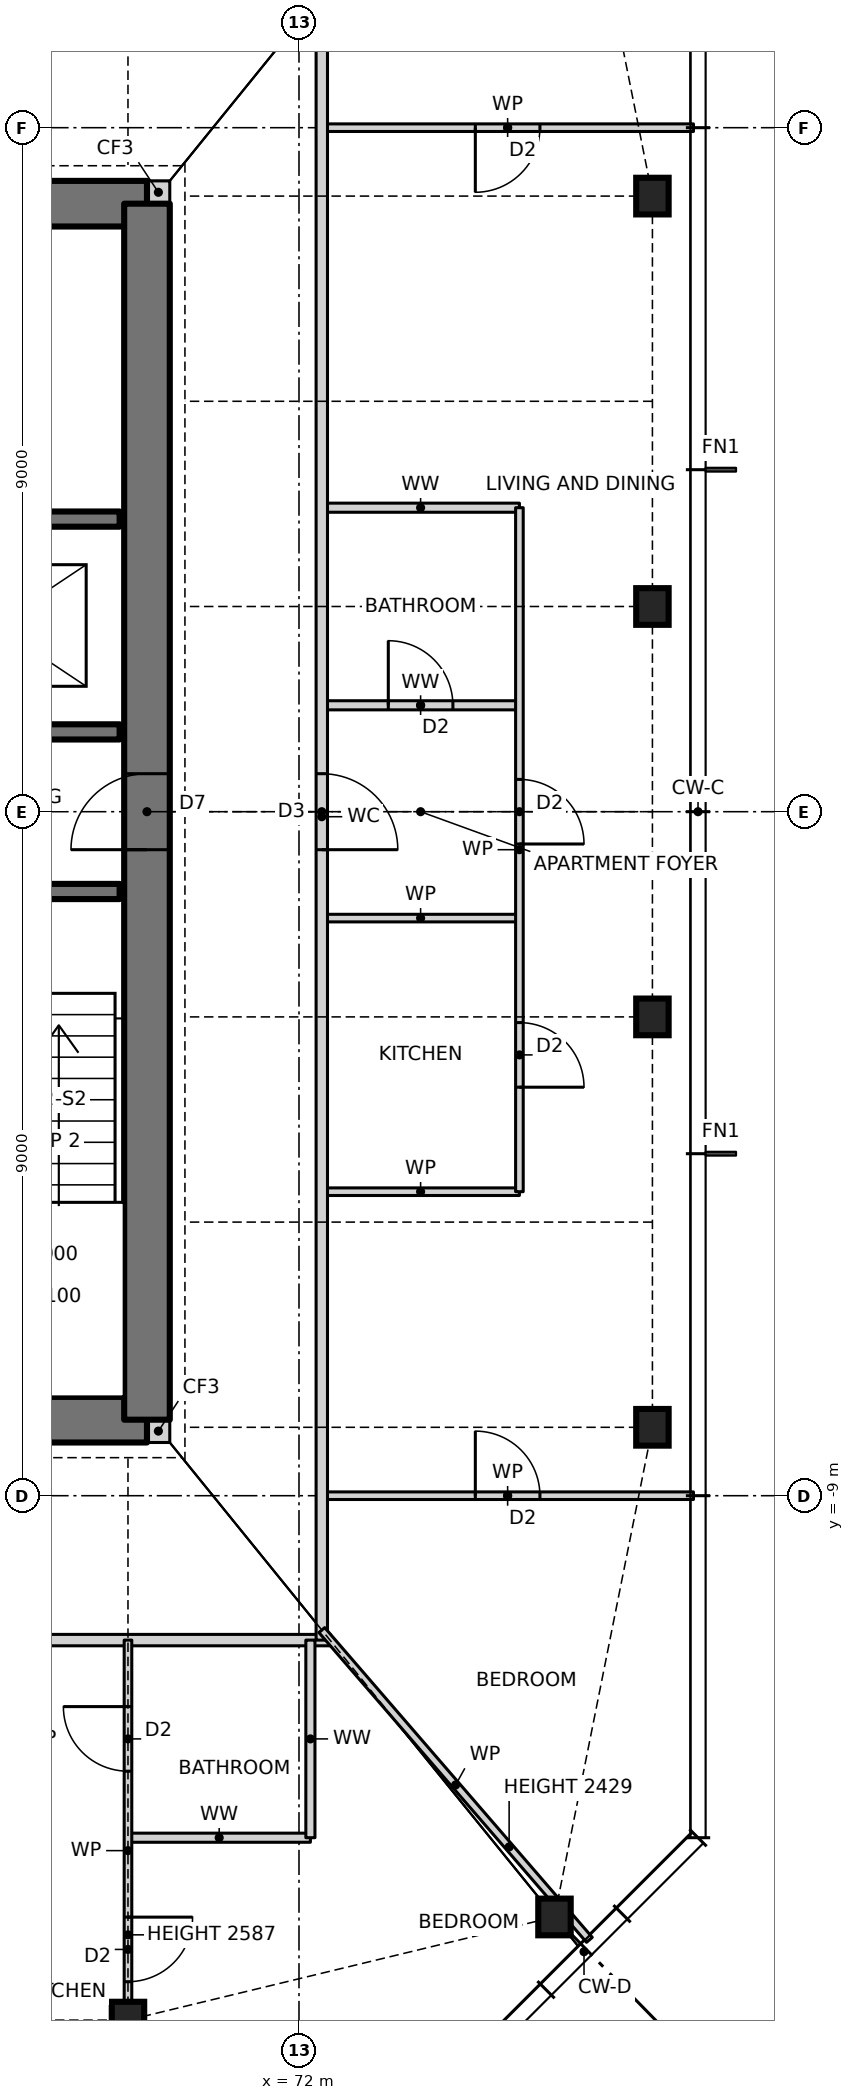
"""IFC4 building model, lengths in metres.
Left out: names, types, materials, properties, quantities, classifications, styles, units other than length and angle.
Written with IfcOpenShell. Run it as: python <this file> out.ifc"""

import sys

from ifc_helpers import new_model, si_unit, direction, frame, frame_2d, origin, origin_2d, place, context, subcontext, project, spatial, rectangle, i_section, extrude, element, fill, save


model = new_model("IFC4")
c1 = context("Model", 3, precision=1e-05, world=origin(), true_north=direction((0.0, 1.0)))
c2 = subcontext(c1, "Body", "Model", "MODEL_VIEW")
j1 = project(units=[si_unit("LENGTHUNIT", "METRE"), si_unit("PLANEANGLEUNIT", "RADIAN")], contexts=[c1])
p1 = place(None, origin())
s1 = spatial("IfcSite", under=j1, at=p1, CompositionType="ELEMENT")
p2 = place(p1, origin())
s2 = spatial("IfcBuilding", under=s1, at=p2, CompositionType="ELEMENT")
p3 = place(p2, frame((0.0, 0.0, 87.5)))
s3 = spatial("IfcBuildingStorey", under=s2, at=p3, CompositionType="ELEMENT", Elevation=87.5)
for number, where, z_axis, x_axis in (
    (1, (69.75, -15.9, 0.0), (0.0, 0.0, 1.0), (1.0, 0.0, 0.0)),
    (2, (75.361, -14.543, 0.0), (0.0, 0.0, 1.0), (1.0, 0.0, 0.0)),
    (3, (76.65, -8.1, 0.0), (0.0, 0.0, 1.0), (1.0, 0.0, 0.0)),
    (4, (76.65, -2.7, 0.0), (0.0, 0.0, 1.0), (1.0, 0.0, 0.0)),
    (5, (76.65, 2.7, 0.0), (0.0, 0.0, 1.0), (1.0, 0.0, 0.0)),
    (6, (76.65, 8.1, 0.0), (0.0, 0.0, 1.0), (1.0, 0.0, 0.0)),
):
    element("IfcColumn", number, at=place(p3, frame(where, z_axis=z_axis, x_axis=x_axis)), inside=s3, PredefinedType="COLUMN", context=c2, shape_type="SweptSolid", body=[
        extrude(i_section(OverallWidth=0.427, OverallDepth=0.483, WebThickness=0.051, FlangeThickness=0.082, at=origin_2d()), origin(), (0.0, 0.0, 1.0), 3.5),
    ])
for number, where, z_axis, x_axis in (
    (7, (70.0, -8.15, 0.0), (0.0, 0.0, 1.0), (1.0, 0.0, 0.0)),
    (8, (70.0, 8.15, 0.0), (0.0, 0.0, 1.0), (1.0, 0.0, 0.0)),
):
    element("IfcWall", number, at=place(p3, frame(where, z_axis=z_axis, x_axis=x_axis)), inside=s3, PredefinedType="SOLIDWALL", context=c2, shape_type="SweptSolid", body=[
        extrude(rectangle(XDim=0.3, YDim=0.3, at=frame_2d((0.15, 0.0))), origin(), (0.0, 0.0, 1.0), 3.5),
    ])
p4 = place(p3, frame((56.0, -8.0, 0.0), z_axis=(0.0, 0.0, 1.0), x_axis=(1.0, 0.0, 0.0)))
e9 = element("IfcWall", 9, at=p4, inside=s3, PredefinedType="SHEAR", context=c2, shape_type="SweptSolid", body=[
    extrude(rectangle(XDim=14.0, YDim=0.6, at=frame_2d((7.0, 0.0))), origin(), (0.0, 0.0, 1.0), 3.5),
])
p5 = place(p4, frame((2.7, 0.0, 0.0)))
e10 = element("IfcOpeningElement", 10, at=p5, cuts=e9, PredefinedType="OPENING", context=c2, shape_type="SweptSolid", body=[
    extrude(rectangle(XDim=0.9, YDim=2.1, at=frame_2d((0.45, 1.05))), frame((0.0, 0.31, 0.0), z_axis=(0.0, -1.0, 0.0), x_axis=(1.0, 0.0, 0.0)), (0.0, 0.0, 1.0), 0.62),
])
p6 = place(p4, frame((7.7, 0.0, 0.0)))
e11 = element("IfcOpeningElement", 11, at=p6, cuts=e9, PredefinedType="OPENING", context=c2, shape_type="SweptSolid", body=[
    extrude(rectangle(XDim=0.9, YDim=2.1, at=frame_2d((0.45, 1.05))), frame((0.0, 0.31, 0.0), z_axis=(0.0, -1.0, 0.0), x_axis=(1.0, 0.0, 0.0)), (0.0, 0.0, 1.0), 0.62),
])
p7 = place(p3, frame((70.0, 8.0, 0.0), z_axis=(0.0, 0.0, 1.0), x_axis=(-1.0, 0.0, 0.0)))
e12 = element("IfcWall", 12, at=p7, inside=s3, PredefinedType="SHEAR", context=c2, shape_type="SweptSolid", body=[
    extrude(rectangle(XDim=14.0, YDim=0.6, at=frame_2d((7.0, 0.0))), origin(), (0.0, 0.0, 1.0), 3.5),
])
p8 = place(p7, frame((8.2, 0.0, 0.0)))
e13 = element("IfcOpeningElement", 13, at=p8, cuts=e12, PredefinedType="OPENING", context=c2, shape_type="SweptSolid", body=[
    extrude(rectangle(XDim=0.9, YDim=2.1, at=frame_2d((0.45, 1.05))), frame((0.0, 0.31, 0.0), z_axis=(0.0, -1.0, 0.0), x_axis=(1.0, 0.0, 0.0)), (0.0, 0.0, 1.0), 0.62),
])
p9 = place(p7, frame((3.2, 0.0, 0.0)))
e14 = element("IfcOpeningElement", 14, at=p9, cuts=e12, PredefinedType="OPENING", context=c2, shape_type="SweptSolid", body=[
    extrude(rectangle(XDim=0.9, YDim=2.1, at=frame_2d((0.45, 1.05))), frame((0.0, 0.31, 0.0), z_axis=(0.0, -1.0, 0.0), x_axis=(1.0, 0.0, 0.0)), (0.0, 0.0, 1.0), 0.62),
])
p10 = place(p3, frame((70.0, -8.0, 0.0), z_axis=(0.0, 0.0, 1.0), x_axis=(0.0, 1.0, 0.0)))
e15 = element("IfcWall", 15, at=p10, inside=s3, PredefinedType="SHEAR", context=c2, shape_type="SweptSolid", body=[
    extrude(rectangle(XDim=16.0, YDim=0.6, at=frame_2d((8.0, 0.0))), origin(), (0.0, 0.0, 1.0), 3.5),
])
p11 = place(p10, frame((7.5, 0.0, 0.0)))
e16 = element("IfcOpeningElement", 16, at=p11, cuts=e15, PredefinedType="OPENING", context=c2, shape_type="SweptSolid", body=[
    extrude(rectangle(XDim=1.0, YDim=2.1, at=frame_2d((0.5, 1.05))), frame((0.0, 0.31, 0.0), z_axis=(0.0, -1.0, 0.0), x_axis=(1.0, 0.0, 0.0)), (0.0, 0.0, 1.0), 0.62),
])
p12 = place(p3, frame((69.75, -13.5, 0.0), z_axis=(0.0, 0.0, 1.0), x_axis=(1.0, 0.0, 0.0)))
e17 = element("IfcWall", 17, at=p12, inside=s3, PredefinedType="PARTITIONING", context=c2, shape_type="SweptSolid", body=[
    extrude(rectangle(XDim=2.4, YDim=0.12, at=frame_2d((1.2, 0.0))), origin(), (0.0, 0.0, 1.0), 3.27),
])
p13 = place(p3, frame((53.586, -10.9, 0.0), z_axis=(0.0, 0.0, 1.0), x_axis=(1.0, 0.0, 0.0)))
e18 = element("IfcWall", 18, at=p13, inside=s3, PredefinedType="PARTITIONING", context=c2, shape_type="SweptSolid", body=[
    extrude(rectangle(XDim=18.828, YDim=0.15, at=frame_2d((9.414, 0.0))), origin(), (0.0, 0.0, 1.0), 3.27),
])
p14 = place(p13, frame((3.564, 0.0, 0.0)))
e19 = element("IfcOpeningElement", 19, at=p14, cuts=e18, PredefinedType="OPENING", context=c2, shape_type="SweptSolid", body=[
    extrude(rectangle(XDim=1.0, YDim=2.1, at=frame_2d((0.5, 1.05))), frame((0.0, 0.085, 0.0), z_axis=(0.0, -1.0, 0.0), x_axis=(1.0, 0.0, 0.0)), (0.0, 0.0, 1.0), 0.17),
])
p15 = place(p13, frame((7.789, 0.0, 0.0)))
e20 = element("IfcOpeningElement", 20, at=p15, cuts=e18, PredefinedType="OPENING", context=c2, shape_type="SweptSolid", body=[
    extrude(rectangle(XDim=1.0, YDim=2.1, at=frame_2d((0.5, 1.05))), frame((0.0, 0.085, 0.0), z_axis=(0.0, -1.0, 0.0), x_axis=(1.0, 0.0, 0.0)), (0.0, 0.0, 1.0), 0.17),
])
p16 = place(p13, frame((12.564, 0.0, 0.0)))
e21 = element("IfcOpeningElement", 21, at=p16, cuts=e18, PredefinedType="OPENING", context=c2, shape_type="SweptSolid", body=[
    extrude(rectangle(XDim=1.0, YDim=2.1, at=frame_2d((0.5, 1.05))), frame((0.0, 0.085, 0.0), z_axis=(0.0, -1.0, 0.0), x_axis=(1.0, 0.0, 0.0)), (0.0, 0.0, 1.0), 0.17),
])
p17 = place(p3, frame((72.3, -9.0, 0.0), z_axis=(0.0, 0.0, 1.0), x_axis=(1.0, 0.0, 0.0)))
e22 = element("IfcWall", 22, at=p17, inside=s3, PredefinedType="PARTITIONING", context=c2, shape_type="SweptSolid", body=[
    extrude(rectangle(XDim=4.89, YDim=0.1, at=frame_2d((2.445, 0.0))), origin(), (0.0, 0.0, 1.0), 3.27),
])
p18 = place(p17, frame((2.02, 0.0, 0.0)))
e23 = element("IfcOpeningElement", 23, at=p18, cuts=e22, PredefinedType="OPENING", context=c2, shape_type="SweptSolid", body=[
    extrude(rectangle(XDim=0.85, YDim=2.1, at=frame_2d((0.425, 1.05))), frame((0.0, 0.06, 0.0), z_axis=(0.0, -1.0, 0.0), x_axis=(1.0, 0.0, 0.0)), (0.0, 0.0, 1.0), 0.12),
])
for number, where, z_axis, x_axis in (
    (24, (72.3, -5.0, 0.0), (0.0, 0.0, 1.0), (1.0, 0.0, 0.0)),
    (25, (72.3, -1.4, 0.0), (0.0, 0.0, 1.0), (1.0, 0.0, 0.0)),
):
    element("IfcWall", number, at=place(p3, frame(where, z_axis=z_axis, x_axis=x_axis)), inside=s3, PredefinedType="PARTITIONING", context=c2, shape_type="SweptSolid", body=[
        extrude(rectangle(XDim=2.6, YDim=0.1, at=frame_2d((1.3, 0.0))), origin(), (0.0, 0.0, 1.0), 3.27),
    ])
p19 = place(p3, frame((56.36, -1.05, 0.0), z_axis=(0.0, 0.0, 1.0), x_axis=(1.0, 0.0, 0.0)))
e26 = element("IfcWall", 26, at=p19, inside=s3, PredefinedType="SOLIDWALL", context=c2, shape_type="SweptSolid", body=[
    extrude(rectangle(XDim=13.28, YDim=0.2, at=frame_2d((6.64, 0.0))), origin(), (0.0, 0.0, 1.0), 3.5),
])
p20 = place(p19, frame((11.11, 0.0, 0.0)))
e27 = element("IfcOpeningElement", 27, at=p20, cuts=e26, PredefinedType="OPENING", context=c2, shape_type="SweptSolid", body=[
    extrude(rectangle(XDim=1.0, YDim=2.1, at=frame_2d((0.5, 1.05))), frame((0.0, 0.11, 0.0), z_axis=(0.0, -1.0, 0.0), x_axis=(1.0, 0.0, 0.0)), (0.0, 0.0, 1.0), 0.22),
])
p21 = place(p19, frame((1.087, 0.0, 0.0)))
e28 = element("IfcOpeningElement", 28, at=p21, cuts=e26, PredefinedType="OPENING", context=c2, shape_type="SweptSolid", body=[
    extrude(rectangle(XDim=1.1, YDim=2.1, at=frame_2d((0.55, 1.05))), frame((0.0, 0.11, 0.0), z_axis=(0.0, -1.0, 0.0), x_axis=(1.0, 0.0, 0.0)), (0.0, 0.0, 1.0), 0.22),
])
p22 = place(p19, frame((4.39, 0.0, 0.0)))
e29 = element("IfcOpeningElement", 29, at=p22, cuts=e26, PredefinedType="OPENING", context=c2, shape_type="SweptSolid", body=[
    extrude(rectangle(XDim=1.1, YDim=2.1, at=frame_2d((0.55, 1.05))), frame((0.0, 0.11, 0.0), z_axis=(0.0, -1.0, 0.0), x_axis=(1.0, 0.0, 0.0)), (0.0, 0.0, 1.0), 0.22),
])
p23 = place(p19, frame((7.724, 0.0, 0.0)))
e30 = element("IfcOpeningElement", 30, at=p23, cuts=e26, PredefinedType="OPENING", context=c2, shape_type="SweptSolid", body=[
    extrude(rectangle(XDim=1.1, YDim=2.1, at=frame_2d((0.55, 1.05))), frame((0.0, 0.11, 0.0), z_axis=(0.0, -1.0, 0.0), x_axis=(1.0, 0.0, 0.0)), (0.0, 0.0, 1.0), 0.22),
])
p24 = place(p3, frame((56.36, 1.05, 0.0), z_axis=(0.0, 0.0, 1.0), x_axis=(1.0, 0.0, 0.0)))
e31 = element("IfcWall", 31, at=p24, inside=s3, PredefinedType="SOLIDWALL", context=c2, shape_type="SweptSolid", body=[
    extrude(rectangle(XDim=13.28, YDim=0.2, at=frame_2d((6.64, 0.0))), origin(), (0.0, 0.0, 1.0), 3.5),
])
p25 = place(p24, frame((1.17, 0.0, 0.0)))
e32 = element("IfcOpeningElement", 32, at=p25, cuts=e31, PredefinedType="OPENING", context=c2, shape_type="SweptSolid", body=[
    extrude(rectangle(XDim=1.0, YDim=2.1, at=frame_2d((0.5, 1.05))), frame((0.0, 0.11, 0.0), z_axis=(0.0, -1.0, 0.0), x_axis=(1.0, 0.0, 0.0)), (0.0, 0.0, 1.0), 0.22),
])
p26 = place(p24, frame((6.19, 0.0, 0.0)))
e33 = element("IfcOpeningElement", 33, at=p26, cuts=e31, PredefinedType="OPENING", context=c2, shape_type="SweptSolid", body=[
    extrude(rectangle(XDim=0.9, YDim=2.1, at=frame_2d((0.45, 1.05))), frame((0.0, 0.11, 0.0), z_axis=(0.0, -1.0, 0.0), x_axis=(1.0, 0.0, 0.0)), (0.0, 0.0, 1.0), 0.22),
])
p27 = place(p24, frame((10.96, 0.0, 0.0)))
e34 = element("IfcOpeningElement", 34, at=p27, cuts=e31, PredefinedType="OPENING", context=c2, shape_type="SweptSolid", body=[
    extrude(rectangle(XDim=1.3, YDim=2.1, at=frame_2d((0.65, 1.05))), frame((0.0, 0.11, 0.0), z_axis=(0.0, -1.0, 0.0), x_axis=(1.0, 0.0, 0.0)), (0.0, 0.0, 1.0), 0.22),
])
p28 = place(p3, frame((72.3, 1.4, 0.0), z_axis=(0.0, 0.0, 1.0), x_axis=(1.0, 0.0, 0.0)))
e35 = element("IfcWall", 35, at=p28, inside=s3, PredefinedType="PARTITIONING", context=c2, shape_type="SweptSolid", body=[
    extrude(rectangle(XDim=2.6, YDim=0.12, at=frame_2d((1.3, 0.0))), origin(), (0.0, 0.0, 1.0), 3.27),
])
p29 = place(p28, frame((0.875, 0.0, 0.0)))
e36 = element("IfcOpeningElement", 36, at=p29, cuts=e35, PredefinedType="OPENING", context=c2, shape_type="SweptSolid", body=[
    extrude(rectangle(XDim=0.85, YDim=2.1, at=frame_2d((0.425, 1.05))), frame((0.0, 0.07, 0.0), z_axis=(0.0, -1.0, 0.0), x_axis=(1.0, 0.0, 0.0)), (0.0, 0.0, 1.0), 0.14),
])
p30 = place(p3, frame((59.7, 3.85, 0.0), z_axis=(0.0, 0.0, 1.0), x_axis=(1.0, 0.0, 0.0)))
e37 = element("IfcWall", 37, at=p30, inside=s3, PredefinedType="SOLIDWALL", context=c2, shape_type="SweptSolid", body=[
    extrude(rectangle(XDim=9.94, YDim=0.2, at=frame_2d((4.97, 0.0))), origin(), (0.0, 0.0, 1.0), 3.5),
])
p31 = place(p3, frame((72.3, 4.0, 0.0), z_axis=(0.0, 0.0, 1.0), x_axis=(1.0, 0.0, 0.0)))
e38 = element("IfcWall", 38, at=p31, inside=s3, PredefinedType="PARTITIONING", context=c2, shape_type="SweptSolid", body=[
    extrude(rectangle(XDim=2.6, YDim=0.12, at=frame_2d((1.3, 0.0))), origin(), (0.0, 0.0, 1.0), 3.27),
])
p32 = place(p3, frame((72.3, 9.0, 0.0), z_axis=(0.0, 0.0, 1.0), x_axis=(1.0, 0.0, 0.0)))
e39 = element("IfcWall", 39, at=p32, inside=s3, PredefinedType="PARTITIONING", context=c2, shape_type="SweptSolid", body=[
    extrude(rectangle(XDim=4.89, YDim=0.1, at=frame_2d((2.445, 0.0))), origin(), (0.0, 0.0, 1.0), 3.27),
])
p33 = place(p32, frame((2.02, 0.0, 0.0)))
e40 = element("IfcOpeningElement", 40, at=p33, cuts=e39, PredefinedType="OPENING", context=c2, shape_type="SweptSolid", body=[
    extrude(rectangle(XDim=0.85, YDim=2.1, at=frame_2d((0.425, 1.05))), frame((0.0, 0.06, 0.0), z_axis=(0.0, -1.0, 0.0), x_axis=(1.0, 0.0, 0.0)), (0.0, 0.0, 1.0), 0.12),
])
p34 = place(p3, frame((74.9, -5.0, 0.0), z_axis=(0.0, 0.0, 1.0), x_axis=(0.0, 1.0, 0.0)))
e41 = element("IfcWall", 41, at=p34, inside=s3, PredefinedType="PARTITIONING", context=c2, shape_type="SweptSolid", body=[
    extrude(rectangle(XDim=9.0, YDim=0.1, at=frame_2d((4.5, 0.0))), origin(), (0.0, 0.0, 1.0), 3.27),
])
p35 = place(p34, frame((1.375, 0.0, 0.0)))
e42 = element("IfcOpeningElement", 42, at=p35, cuts=e41, PredefinedType="OPENING", context=c2, shape_type="SweptSolid", body=[
    extrude(rectangle(XDim=0.85, YDim=2.1, at=frame_2d((0.425, 1.05))), frame((0.0, 0.06, 0.0), z_axis=(0.0, -1.0, 0.0), x_axis=(1.0, 0.0, 0.0)), (0.0, 0.0, 1.0), 0.12),
])
p36 = place(p34, frame((4.575, 0.0, 0.0)))
e43 = element("IfcOpeningElement", 43, at=p36, cuts=e41, PredefinedType="OPENING", context=c2, shape_type="SweptSolid", body=[
    extrude(rectangle(XDim=0.85, YDim=2.1, at=frame_2d((0.425, 1.05))), frame((0.0, 0.06, 0.0), z_axis=(0.0, -1.0, 0.0), x_axis=(1.0, 0.0, 0.0)), (0.0, 0.0, 1.0), 0.12),
])
p37 = place(p3, frame((72.3, -10.9, 0.0), z_axis=(0.0, 0.0, 1.0), x_axis=(0.0, 1.0, 0.0)))
e44 = element("IfcWall", 44, at=p37, inside=s3, PredefinedType="PARTITIONING", context=c2, shape_type="SweptSolid", body=[
    extrude(rectangle(XDim=21.668, YDim=0.15, at=frame_2d((10.834, 0.0))), origin(), (0.0, 0.0, 1.0), 3.27),
])
p38 = place(p37, frame((10.4, 0.0, 0.0)))
e45 = element("IfcOpeningElement", 45, at=p38, cuts=e44, PredefinedType="OPENING", context=c2, shape_type="SweptSolid", body=[
    extrude(rectangle(XDim=1.0, YDim=2.1, at=frame_2d((0.5, 1.05))), frame((0.0, 0.085, 0.0), z_axis=(0.0, -1.0, 0.0), x_axis=(1.0, 0.0, 0.0)), (0.0, 0.0, 1.0), 0.17),
])
p39 = place(p3, frame((72.15, -13.5, 0.0), z_axis=(0.0, 0.0, 1.0), x_axis=(0.0, 1.0, 0.0)))
e46 = element("IfcWall", 46, at=p39, inside=s3, PredefinedType="PARTITIONING", context=c2, shape_type="SweptSolid", body=[
    extrude(rectangle(XDim=2.6, YDim=0.12, at=frame_2d((1.3, 0.0))), origin(), (0.0, 0.0, 1.0), 3.27),
])
p40 = place(p3, frame((69.75, -16.44, 0.0), z_axis=(0.0, 0.0, 1.0), x_axis=(0.0, 1.0, 0.0)))
e47 = element("IfcWall", 47, at=p40, inside=s3, PredefinedType="PARTITIONING", context=c2, shape_type="SweptSolid", body=[
    extrude(rectangle(XDim=5.54, YDim=0.1, at=frame_2d((2.77, 0.0))), origin(), (0.0, 0.0, 1.0), 2.587),
])
p41 = place(p40, frame((3.815, 0.0, 0.0)))
e48 = element("IfcOpeningElement", 48, at=p41, cuts=e47, PredefinedType="OPENING", context=c2, shape_type="SweptSolid", body=[
    extrude(rectangle(XDim=0.85, YDim=2.1, at=frame_2d((0.425, 1.05))), frame((0.0, 0.06, 0.0), z_axis=(0.0, -1.0, 0.0), x_axis=(1.0, 0.0, 0.0)), (0.0, 0.0, 1.0), 0.12),
])
p42 = place(p40, frame((1.045, 0.0, 0.0)))
e49 = element("IfcOpeningElement", 49, at=p42, cuts=e47, PredefinedType="OPENING", context=c2, shape_type="SweptSolid", body=[
    extrude(rectangle(XDim=0.85, YDim=2.1, at=frame_2d((0.425, 1.05))), frame((0.0, 0.06, 0.0), z_axis=(0.0, -1.0, 0.0), x_axis=(1.0, 0.0, 0.0)), (0.0, 0.0, 1.0), 0.12),
])
p43 = place(p3, frame((75.821, -14.844, 0.0), z_axis=(0.0, 0.0, 1.0), x_axis=(-0.653713095188, 0.756742485381, 0.0)))
e50 = element("IfcWall", 50, at=p43, inside=s3, PredefinedType="PARTITIONING", context=c2, shape_type="SweptSolid", body=[
    extrude(rectangle(XDim=5.386, YDim=0.1, at=frame_2d((2.693, 0.0))), origin(), (0.0, 0.0, 1.0), 2.429),
])
p44 = place(p41, origin())
e51 = element("IfcDoor", 51, at=p44, inside=s3, OperationType="SINGLE_SWING_RIGHT", PredefinedType="DOOR", context=c2, shape_type="SweptSolid", body=[
    extrude(rectangle(XDim=0.85, YDim=2.1, at=frame_2d((0.425, 1.05))), frame((0.0, 0.025, 0.0), z_axis=(0.0, -1.0, 0.0), x_axis=(1.0, 0.0, 0.0)), (0.0, 0.0, 1.0), 0.05),
])
fill(e48, e51)
p45 = place(p42, frame((0.85, 0.0, 0.0), z_axis=(0.0, 0.0, 1.0), x_axis=(-1.0, 0.0, 0.0)))
e52 = element("IfcDoor", 52, at=p45, inside=s3, OperationType="SINGLE_SWING_LEFT", PredefinedType="DOOR", context=c2, shape_type="SweptSolid", body=[
    extrude(rectangle(XDim=0.85, YDim=2.1, at=frame_2d((0.425, 1.05))), frame((0.0, 0.025, 0.0), z_axis=(0.0, -1.0, 0.0), x_axis=(1.0, 0.0, 0.0)), (0.0, 0.0, 1.0), 0.05),
])
fill(e49, e52)
p46 = place(p35, frame((0.85, 0.0, 0.0), z_axis=(0.0, 0.0, 1.0), x_axis=(-1.0, 0.0, 0.0)))
e53 = element("IfcDoor", 53, at=p46, inside=s3, OperationType="SINGLE_SWING_RIGHT", PredefinedType="DOOR", context=c2, shape_type="SweptSolid", body=[
    extrude(rectangle(XDim=0.85, YDim=2.1, at=frame_2d((0.425, 1.05))), frame((0.0, 0.025, 0.0), z_axis=(0.0, -1.0, 0.0), x_axis=(1.0, 0.0, 0.0)), (0.0, 0.0, 1.0), 0.05),
])
fill(e42, e53)
p47 = place(p38, frame((1.0, 0.0, 0.0), z_axis=(0.0, 0.0, 1.0), x_axis=(-1.0, 0.0, 0.0)))
e54 = element("IfcDoor", 54, at=p47, inside=s3, OperationType="SINGLE_SWING_RIGHT", PredefinedType="DOOR", context=c2, shape_type="SweptSolid", body=[
    extrude(rectangle(XDim=1.0, YDim=2.1, at=frame_2d((0.5, 1.05))), frame((0.0, 0.025, 0.0), z_axis=(0.0, -1.0, 0.0), x_axis=(1.0, 0.0, 0.0)), (0.0, 0.0, 1.0), 0.05),
])
fill(e45, e54)
p48 = place(p36, frame((0.85, 0.0, 0.0), z_axis=(0.0, 0.0, 1.0), x_axis=(-1.0, 0.0, 0.0)))
e55 = element("IfcDoor", 55, at=p48, inside=s3, OperationType="SINGLE_SWING_RIGHT", PredefinedType="DOOR", context=c2, shape_type="SweptSolid", body=[
    extrude(rectangle(XDim=0.85, YDim=2.1, at=frame_2d((0.425, 1.05))), frame((0.0, 0.025, 0.0), z_axis=(0.0, -1.0, 0.0), x_axis=(1.0, 0.0, 0.0)), (0.0, 0.0, 1.0), 0.05),
])
fill(e43, e55)
p49 = place(p29, origin())
e56 = element("IfcDoor", 56, at=p49, inside=s3, OperationType="SINGLE_SWING_LEFT", PredefinedType="DOOR", context=c2, shape_type="SweptSolid", body=[
    extrude(rectangle(XDim=0.85, YDim=2.1, at=frame_2d((0.425, 1.05))), frame((0.0, 0.025, 0.0), z_axis=(0.0, -1.0, 0.0), x_axis=(1.0, 0.0, 0.0)), (0.0, 0.0, 1.0), 0.05),
])
fill(e36, e56)
p50 = place(p18, origin())
e57 = element("IfcDoor", 57, at=p50, inside=s3, OperationType="SINGLE_SWING_LEFT", PredefinedType="DOOR", context=c2, shape_type="SweptSolid", body=[
    extrude(rectangle(XDim=0.85, YDim=2.1, at=frame_2d((0.425, 1.05))), frame((0.0, 0.025, 0.0), z_axis=(0.0, -1.0, 0.0), x_axis=(1.0, 0.0, 0.0)), (0.0, 0.0, 1.0), 0.05),
])
fill(e23, e57)
p51 = place(p33, frame((0.85, 0.0, 0.0), z_axis=(0.0, 0.0, 1.0), x_axis=(-1.0, 0.0, 0.0)))
e58 = element("IfcDoor", 58, at=p51, inside=s3, OperationType="SINGLE_SWING_RIGHT", PredefinedType="DOOR", context=c2, shape_type="SweptSolid", body=[
    extrude(rectangle(XDim=0.85, YDim=2.1, at=frame_2d((0.425, 1.05))), frame((0.0, 0.025, 0.0), z_axis=(0.0, -1.0, 0.0), x_axis=(1.0, 0.0, 0.0)), (0.0, 0.0, 1.0), 0.05),
])
fill(e40, e58)
p52 = place(p11, origin())
e59 = element("IfcDoor", 59, at=p52, inside=s3, OperationType="SINGLE_SWING_LEFT", PredefinedType="DOOR", context=c2, shape_type="SweptSolid", body=[
    extrude(rectangle(XDim=1.0, YDim=2.1, at=frame_2d((0.5, 1.05))), frame((0.0, 0.025, 0.0), z_axis=(0.0, -1.0, 0.0), x_axis=(1.0, 0.0, 0.0)), (0.0, 0.0, 1.0), 0.05),
])
fill(e16, e59)
save(model, sys.argv[1])
